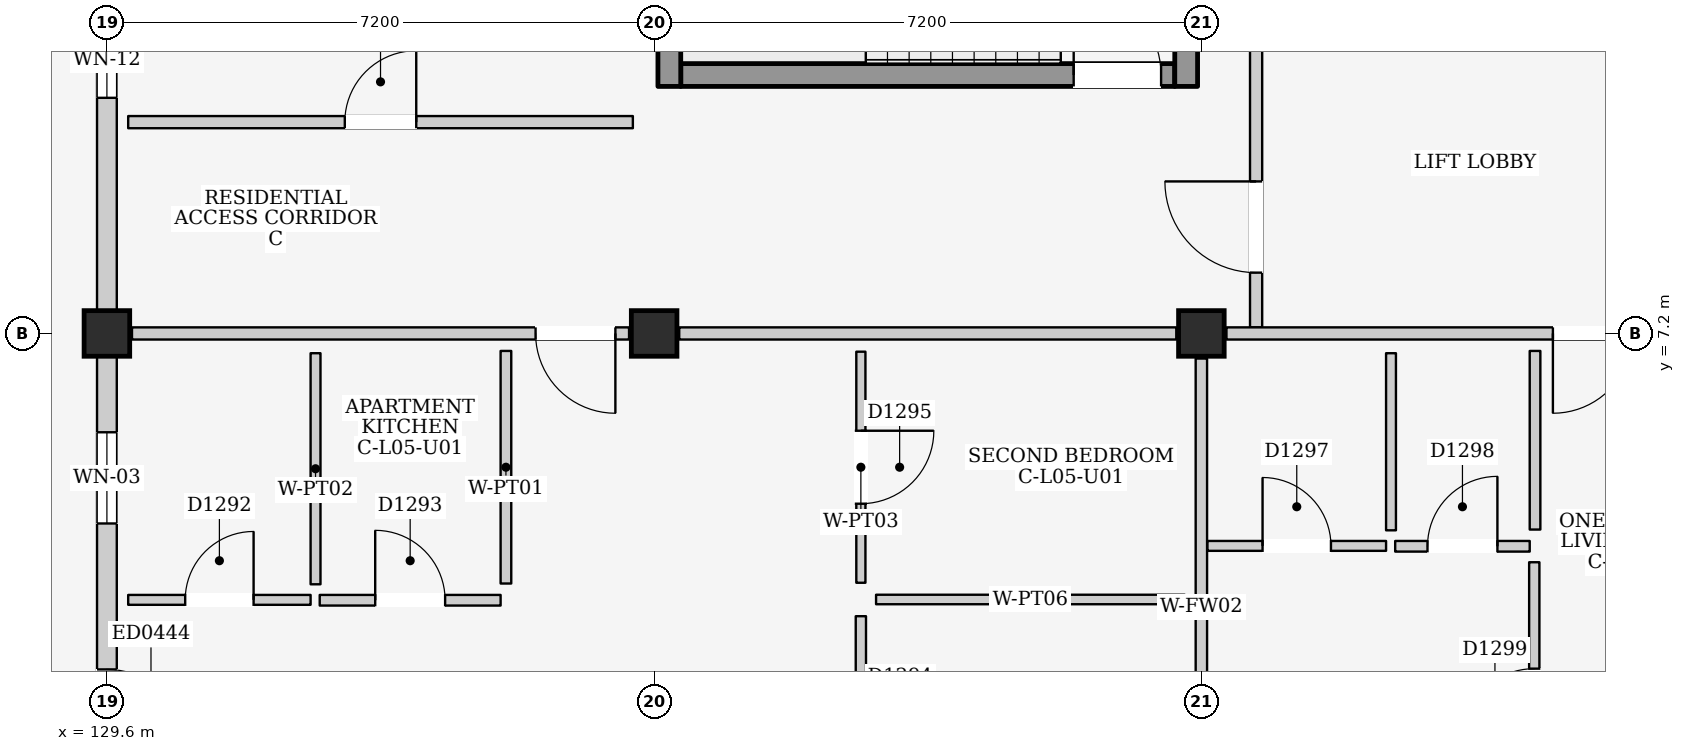
"""IFC4 building model, lengths in metres.
Left out: names, types, materials, properties, quantities, classifications, styles, units other than length and angle.
Written with IfcOpenShell. Run it as: python <this file> out.ifc"""

import sys

from ifc_helpers import new_model, si_unit, direction, frame, frame_2d, origin, origin_2d, place, context, subcontext, project, spatial, rectangle, extrude, element, fill, save


model = new_model("IFC4")
c1 = context("Model", 3, precision=1e-05, world=origin(), true_north=direction((0.0, 1.0)))
c2 = subcontext(c1, "Body", "Model", "MODEL_VIEW")
j1 = project(units=[si_unit("LENGTHUNIT", "METRE"), si_unit("PLANEANGLEUNIT", "RADIAN")], contexts=[c1])
p1 = place(None, origin())
s1 = spatial("IfcSite", under=j1, at=p1, CompositionType="ELEMENT")
p2 = place(p1, origin())
s2 = spatial("IfcBuilding", under=s1, at=p2, CompositionType="ELEMENT")
p3 = place(p2, frame((0.0, 0.0, 18.6)))
s3 = spatial("IfcBuildingStorey", under=s2, at=p3, CompositionType="ELEMENT", Elevation=18.6)
for number, where, z_axis, x_axis in (
    (1, (129.6, 7.2, 0.0), (0.0, 0.0, 1.0), (1.0, 0.0, 0.0)),
    (2, (136.8, 7.2, 0.0), (0.0, 0.0, 1.0), (1.0, 0.0, 0.0)),
    (3, (144.0, 7.2, 0.0), (0.0, 0.0, 1.0), (1.0, 0.0, 0.0)),
):
    element("IfcColumn", number, at=place(p3, frame(where, z_axis=z_axis, x_axis=x_axis)), inside=s3, PredefinedType="COLUMN", context=c2, shape_type="SweptSolid", body=[
        extrude(rectangle(XDim=0.6, YDim=0.6, at=origin_2d()), origin(), (0.0, 0.0, 1.0), 3.3),
    ])
p4 = place(p3, frame((129.6, 0.3, 0.0), z_axis=(0.0, 0.0, 1.0), x_axis=(0.0, 1.0, 0.0)))
e4 = element("IfcWall", 4, at=p4, inside=s3, PredefinedType="ELEMENTEDWALL", context=c2, shape_type="SweptSolid", body=[
    extrude(rectangle(XDim=6.6, YDim=0.26, at=frame_2d((3.3, 0.0))), origin(), (0.0, 0.0, 1.0), 2.545),
])
p5 = place(p4, frame((1.4, 0.0, 0.0)))
e5 = element("IfcOpeningElement", 5, at=p5, cuts=e4, PredefinedType="OPENING", context=c2, shape_type="SweptSolid", body=[
    extrude(rectangle(XDim=1.08, YDim=2.12, at=frame_2d((0.54, 1.06))), frame((0.0, 0.145, 0.0), z_axis=(0.0, -1.0, 0.0), x_axis=(1.0, 0.0, 0.0)), (0.0, 0.0, 1.0), 0.29),
])
p6 = place(p4, frame((4.4, 0.0, 0.95)))
e6 = element("IfcOpeningElement", 6, at=p6, cuts=e4, PredefinedType="OPENING", context=c2, shape_type="SweptSolid", body=[
    extrude(rectangle(XDim=1.2, YDim=1.35, at=frame_2d((0.6, 0.675))), frame((0.0, 0.145, 0.0), z_axis=(0.0, -1.0, 0.0), x_axis=(1.0, 0.0, 0.0)), (0.0, 0.0, 1.0), 0.29),
])
p7 = place(p3, frame((129.6, 7.5, 0.0), z_axis=(0.0, 0.0, 1.0), x_axis=(0.0, 1.0, 0.0)))
e7 = element("IfcWall", 7, at=p7, inside=s3, PredefinedType="ELEMENTEDWALL", context=c2, shape_type="SweptSolid", body=[
    extrude(rectangle(XDim=6.6, YDim=0.26, at=frame_2d((3.3, 0.0))), origin(), (0.0, 0.0, 1.0), 2.545),
])
p8 = place(p7, frame((2.8, 0.0, 1.1)))
e8 = element("IfcOpeningElement", 8, at=p8, cuts=e7, PredefinedType="OPENING", context=c2, shape_type="SweptSolid", body=[
    extrude(rectangle(XDim=1.0, YDim=0.9, at=frame_2d((0.5, 0.45))), frame((0.0, 0.145, 0.0), z_axis=(0.0, -1.0, 0.0), x_axis=(1.0, 0.0, 0.0)), (0.0, 0.0, 1.0), 0.29),
])
p9 = place(p3, frame((137.15, 10.6, 0.0), z_axis=(0.0, 0.0, 1.0), x_axis=(1.0, 0.0, 0.0)))
e9 = element("IfcWall", 9, at=p9, inside=s3, PredefinedType="SHEAR", context=c2, shape_type="SweptSolid", body=[
    extrude(rectangle(XDim=6.5, YDim=0.3, at=frame_2d((3.25, 0.0))), origin(), (0.0, 0.0, 1.0), 3.06),
])
p10 = place(p9, frame((5.17, 0.0, 0.0)))
e10 = element("IfcOpeningElement", 10, at=p10, cuts=e9, PredefinedType="OPENING", context=c2, shape_type="SweptSolid", body=[
    extrude(rectangle(XDim=1.15, YDim=2.2, at=frame_2d((0.575, 1.1))), frame((0.0, 0.165, 0.0), z_axis=(0.0, -1.0, 0.0), x_axis=(1.0, 0.0, 0.0)), (0.0, 0.0, 1.0), 0.33),
])
p11 = place(p3, frame((137.0, 10.45, 0.0), z_axis=(0.0, 0.0, 1.0), x_axis=(0.0, 1.0, 0.0)))
e11 = element("IfcWall", 11, at=p11, inside=s3, PredefinedType="SHEAR", context=c2, shape_type="SweptSolid", body=[
    extrude(rectangle(XDim=3.6, YDim=0.3, at=frame_2d((1.8, 0.0))), origin(), (0.0, 0.0, 1.0), 3.06),
])
p12 = place(p3, frame((143.8, 10.45, 0.0), z_axis=(0.0, 0.0, 1.0), x_axis=(0.0, 1.0, 0.0)))
e12 = element("IfcWall", 12, at=p12, inside=s3, PredefinedType="SHEAR", context=c2, shape_type="SweptSolid", body=[
    extrude(rectangle(XDim=3.75, YDim=0.3, at=frame_2d((1.875, 0.0))), origin(), (0.0, 0.0, 1.0), 3.06),
])
p13 = place(p3, frame((144.72, 7.28, 0.0), z_axis=(0.0, 0.0, 1.0), x_axis=(0.0, 1.0, 0.0)))
e13 = element("IfcWall", 13, at=p13, inside=s3, PredefinedType="PARTITIONING", context=c2, shape_type="SweptSolid", body=[
    extrude(rectangle(XDim=4.32, YDim=0.16, at=frame_2d((2.16, 0.0))), origin(), (0.0, 0.0, 1.0), 3.06),
])
p14 = place(p13, frame((0.72, 0.0, 0.0)))
e14 = element("IfcOpeningElement", 14, at=p14, cuts=e13, PredefinedType="OPENING", context=c2, shape_type="SweptSolid", body=[
    extrude(rectangle(XDim=1.2, YDim=2.2, at=frame_2d((0.6, 1.1))), frame((0.0, 0.095, 0.0), z_axis=(0.0, -1.0, 0.0), x_axis=(1.0, 0.0, 0.0)), (0.0, 0.0, 1.0), 0.19),
])
p15 = place(p3, frame((129.93, 7.2, 0.0), z_axis=(0.0, 0.0, 1.0), x_axis=(1.0, 0.0, 0.0)))
e15 = element("IfcWall", 15, at=p15, inside=s3, PredefinedType="PARTITIONING", context=c2, shape_type="SweptSolid", body=[
    extrude(rectangle(XDim=6.54, YDim=0.16, at=frame_2d((3.27, 0.0))), origin(), (0.0, 0.0, 1.0), 2.445),
])
p16 = place(p15, frame((5.31, 0.0, 0.0)))
e16 = element("IfcOpeningElement", 16, at=p16, cuts=e15, PredefinedType="OPENING", context=c2, shape_type="SweptSolid", body=[
    extrude(rectangle(XDim=1.05, YDim=2.15, at=frame_2d((0.525, 1.075))), frame((0.0, 0.095, 0.0), z_axis=(0.0, -1.0, 0.0), x_axis=(1.0, 0.0, 0.0)), (0.0, 0.0, 1.0), 0.19),
])
p17 = place(p3, frame((137.13, 7.2, 0.0), z_axis=(0.0, 0.0, 1.0), x_axis=(1.0, 0.0, 0.0)))
e17 = element("IfcWall", 17, at=p17, inside=s3, PredefinedType="PARTITIONING", context=c2, shape_type="SweptSolid", body=[
    extrude(rectangle(XDim=6.54, YDim=0.16, at=frame_2d((3.27, 0.0))), origin(), (0.0, 0.0, 1.0), 2.445),
])
p18 = place(p3, frame((144.0, 0.33, 0.0), z_axis=(0.0, 0.0, 1.0), x_axis=(0.0, 1.0, 0.0)))
e18 = element("IfcWall", 18, at=p18, inside=s3, PredefinedType="PARTITIONING", context=c2, shape_type="SweptSolid", body=[
    extrude(rectangle(XDim=6.54, YDim=0.15, at=frame_2d((3.27, 0.0))), origin(), (0.0, 0.0, 1.0), 2.545),
])
p19 = place(p3, frame((129.88, 3.695, 0.0), z_axis=(0.0, 0.0, 1.0), x_axis=(1.0, 0.0, 0.0)))
e19 = element("IfcWall", 19, at=p19, inside=s3, PredefinedType="PARTITIONING", context=c2, shape_type="SweptSolid", body=[
    extrude(rectangle(XDim=2.4, YDim=0.13, at=frame_2d((1.2, 0.0))), origin(), (0.0, 0.0, 1.0), 3.06),
])
p20 = place(p19, frame((0.75, 0.0, 0.0)))
e20 = element("IfcOpeningElement", 20, at=p20, cuts=e19, PredefinedType="OPENING", context=c2, shape_type="SweptSolid", body=[
    extrude(rectangle(XDim=0.9, YDim=2.1, at=frame_2d((0.45, 1.05))), frame((0.0, 0.08, 0.0), z_axis=(0.0, -1.0, 0.0), x_axis=(1.0, 0.0, 0.0)), (0.0, 0.0, 1.0), 0.16),
])
p21 = place(p3, frame((132.345, 3.9, 0.0), z_axis=(0.0, 0.0, 1.0), x_axis=(0.0, 1.0, 0.0)))
e21 = element("IfcWall", 21, at=p21, inside=s3, PredefinedType="PARTITIONING", context=c2, shape_type="SweptSolid", body=[
    extrude(rectangle(XDim=3.04, YDim=0.13, at=frame_2d((1.52, 0.0))), origin(), (0.0, 0.0, 1.0), 3.06),
])
p22 = place(p3, frame((132.4, 3.69, 0.0), z_axis=(0.0, 0.0, 1.0), x_axis=(1.0, 0.0, 0.0)))
e22 = element("IfcWall", 22, at=p22, inside=s3, PredefinedType="PARTITIONING", context=c2, shape_type="SweptSolid", body=[
    extrude(rectangle(XDim=2.38, YDim=0.14, at=frame_2d((1.19, 0.0))), origin(), (0.0, 0.0, 1.0), 3.06),
])
p23 = place(p22, frame((0.73, 0.0, 0.0)))
e23 = element("IfcOpeningElement", 23, at=p23, cuts=e22, PredefinedType="OPENING", context=c2, shape_type="SweptSolid", body=[
    extrude(rectangle(XDim=0.92, YDim=2.1, at=frame_2d((0.46, 1.05))), frame((0.0, 0.085, 0.0), z_axis=(0.0, -1.0, 0.0), x_axis=(1.0, 0.0, 0.0)), (0.0, 0.0, 1.0), 0.17),
])
p24 = place(p3, frame((134.85, 3.91, 0.0), z_axis=(0.0, 0.0, 1.0), x_axis=(0.0, 1.0, 0.0)))
e24 = element("IfcWall", 24, at=p24, inside=s3, PredefinedType="PARTITIONING", context=c2, shape_type="SweptSolid", body=[
    extrude(rectangle(XDim=3.06, YDim=0.14, at=frame_2d((1.53, 0.0))), origin(), (0.0, 0.0, 1.0), 3.06),
])
p25 = place(p3, frame((139.52, 0.44, 0.0), z_axis=(0.0, 0.0, 1.0), x_axis=(0.0, 1.0, 0.0)))
e25 = element("IfcWall", 25, at=p25, inside=s3, PredefinedType="PARTITIONING", context=c2, shape_type="SweptSolid", body=[
    extrude(rectangle(XDim=3.04, YDim=0.135, at=frame_2d((1.52, 0.0))), origin(), (0.0, 0.0, 1.0), 3.06),
])
p26 = place(p25, frame((1.045, 0.0, 0.0)))
e26 = element("IfcOpeningElement", 26, at=p26, cuts=e25, PredefinedType="OPENING", context=c2, shape_type="SweptSolid", body=[
    extrude(rectangle(XDim=0.95, YDim=2.15, at=frame_2d((0.475, 1.075))), frame((0.0, 0.083, 0.0), z_axis=(0.0, -1.0, 0.0), x_axis=(1.0, 0.0, 0.0)), (0.0, 0.0, 1.0), 0.165),
])
p27 = place(p3, frame((139.72, 3.7, 0.0), z_axis=(0.0, 0.0, 1.0), x_axis=(1.0, 0.0, 0.0)))
e27 = element("IfcWall", 27, at=p27, inside=s3, PredefinedType="PARTITIONING", context=c2, shape_type="SweptSolid", body=[
    extrude(rectangle(XDim=4.06, YDim=0.125, at=frame_2d((2.03, 0.0))), origin(), (0.0, 0.0, 1.0), 3.06),
])
p28 = place(p3, frame((139.52, 3.92, 0.0), z_axis=(0.0, 0.0, 1.0), x_axis=(0.0, 1.0, 0.0)))
e28 = element("IfcWall", 28, at=p28, inside=s3, PredefinedType="PARTITIONING", context=c2, shape_type="SweptSolid", body=[
    extrude(rectangle(XDim=3.04, YDim=0.12, at=frame_2d((1.52, 0.0))), origin(), (0.0, 0.0, 1.0), 3.06),
])
p29 = place(p28, frame((1.04, 0.0, 0.0)))
e29 = element("IfcOpeningElement", 29, at=p29, cuts=e28, PredefinedType="OPENING", context=c2, shape_type="SweptSolid", body=[
    extrude(rectangle(XDim=0.96, YDim=2.15, at=frame_2d((0.48, 1.075))), frame((0.0, 0.075, 0.0), z_axis=(0.0, -1.0, 0.0), x_axis=(1.0, 0.0, 0.0)), (0.0, 0.0, 1.0), 0.15),
])
p30 = place(p3, frame((144.33, 7.2, 0.0), z_axis=(0.0, 0.0, 1.0), x_axis=(1.0, 0.0, 0.0)))
e30 = element("IfcWall", 30, at=p30, inside=s3, PredefinedType="PARTITIONING", context=c2, shape_type="SweptSolid", body=[
    extrude(rectangle(XDim=6.54, YDim=0.16, at=frame_2d((3.27, 0.0))), origin(), (0.0, 0.0, 1.0), 2.445),
])
p31 = place(p30, frame((4.295, 0.0, 0.0)))
e31 = element("IfcOpeningElement", 31, at=p31, cuts=e30, PredefinedType="OPENING", context=c2, shape_type="SweptSolid", body=[
    extrude(rectangle(XDim=1.05, YDim=2.15, at=frame_2d((0.525, 1.075))), frame((0.0, 0.095, 0.0), z_axis=(0.0, -1.0, 0.0), x_axis=(1.0, 0.0, 0.0)), (0.0, 0.0, 1.0), 0.19),
])
p32 = place(p3, frame((144.08, 4.405, 0.0), z_axis=(0.0, 0.0, 1.0), x_axis=(1.0, 0.0, 0.0)))
e32 = element("IfcWall", 32, at=p32, inside=s3, PredefinedType="PARTITIONING", context=c2, shape_type="SweptSolid", body=[
    extrude(rectangle(XDim=2.35, YDim=0.13, at=frame_2d((1.175, 0.0))), origin(), (0.0, 0.0, 1.0), 3.06),
])
p33 = place(p32, frame((0.725, 0.0, 0.0)))
e33 = element("IfcOpeningElement", 33, at=p33, cuts=e32, PredefinedType="OPENING", context=c2, shape_type="SweptSolid", body=[
    extrude(rectangle(XDim=0.9, YDim=2.1, at=frame_2d((0.45, 1.05))), frame((0.0, 0.08, 0.0), z_axis=(0.0, -1.0, 0.0), x_axis=(1.0, 0.0, 0.0)), (0.0, 0.0, 1.0), 0.16),
])
p34 = place(p3, frame((146.495, 4.61, 0.0), z_axis=(0.0, 0.0, 1.0), x_axis=(0.0, 1.0, 0.0)))
e34 = element("IfcWall", 34, at=p34, inside=s3, PredefinedType="PARTITIONING", context=c2, shape_type="SweptSolid", body=[
    extrude(rectangle(XDim=2.33, YDim=0.13, at=frame_2d((1.165, 0.0))), origin(), (0.0, 0.0, 1.0), 3.06),
])
p35 = place(p3, frame((146.55, 4.4, 0.0), z_axis=(0.0, 0.0, 1.0), x_axis=(1.0, 0.0, 0.0)))
e35 = element("IfcWall", 35, at=p35, inside=s3, PredefinedType="PARTITIONING", context=c2, shape_type="SweptSolid", body=[
    extrude(rectangle(XDim=1.77, YDim=0.14, at=frame_2d((0.885, 0.0))), origin(), (0.0, 0.0, 1.0), 3.06),
])
p36 = place(p35, frame((0.425, 0.0, 0.0)))
e36 = element("IfcOpeningElement", 36, at=p36, cuts=e35, PredefinedType="OPENING", context=c2, shape_type="SweptSolid", body=[
    extrude(rectangle(XDim=0.92, YDim=2.1, at=frame_2d((0.46, 1.05))), frame((0.0, 0.085, 0.0), z_axis=(0.0, -1.0, 0.0), x_axis=(1.0, 0.0, 0.0)), (0.0, 0.0, 1.0), 0.17),
])
p37 = place(p3, frame((148.39, 4.62, 0.0), z_axis=(0.0, 0.0, 1.0), x_axis=(0.0, 1.0, 0.0)))
e37 = element("IfcWall", 37, at=p37, inside=s3, PredefinedType="PARTITIONING", context=c2, shape_type="SweptSolid", body=[
    extrude(rectangle(XDim=2.35, YDim=0.14, at=frame_2d((1.175, 0.0))), origin(), (0.0, 0.0, 1.0), 3.06),
])
p38 = place(p3, frame((148.38, 0.44, 0.0), z_axis=(0.0, 0.0, 1.0), x_axis=(0.0, 1.0, 0.0)))
e38 = element("IfcWall", 38, at=p38, inside=s3, PredefinedType="PARTITIONING", context=c2, shape_type="SweptSolid", body=[
    extrude(rectangle(XDim=3.75, YDim=0.135, at=frame_2d((1.875, 0.0))), origin(), (0.0, 0.0, 1.0), 3.06),
])
p39 = place(p38, frame((1.4, 0.0, 0.0)))
e39 = element("IfcOpeningElement", 39, at=p39, cuts=e38, PredefinedType="OPENING", context=c2, shape_type="SweptSolid", body=[
    extrude(rectangle(XDim=0.95, YDim=2.15, at=frame_2d((0.475, 1.075))), frame((0.0, 0.083, 0.0), z_axis=(0.0, -1.0, 0.0), x_axis=(1.0, 0.0, 0.0)), (0.0, 0.0, 1.0), 0.165),
])
p40 = place(p3, frame((129.88, 9.98, 0.0), z_axis=(0.0, 0.0, 1.0), x_axis=(1.0, 0.0, 0.0)))
e40 = element("IfcWall", 40, at=p40, inside=s3, PredefinedType="PARTITIONING", context=c2, shape_type="SweptSolid", body=[
    extrude(rectangle(XDim=6.64, YDim=0.16, at=frame_2d((3.32, 0.0))), origin(), (0.0, 0.0, 1.0), 3.06),
])
p41 = place(p40, frame((2.85, 0.0, 0.0)))
e41 = element("IfcOpeningElement", 41, at=p41, cuts=e40, PredefinedType="OPENING", context=c2, shape_type="SweptSolid", body=[
    extrude(rectangle(XDim=0.94, YDim=2.12, at=frame_2d((0.47, 1.06))), frame((0.0, 0.095, 0.0), z_axis=(0.0, -1.0, 0.0), x_axis=(1.0, 0.0, 0.0)), (0.0, 0.0, 1.0), 0.19),
])
p42 = place(p5, frame((1.08, 0.0, 0.0), z_axis=(0.0, 0.0, 1.0), x_axis=(-1.0, 0.0, 0.0)))
e42 = element("IfcDoor", 42, at=p42, inside=s3, OperationType="SINGLE_SWING_RIGHT", PredefinedType="DOOR", context=c2, shape_type="SweptSolid", body=[
    extrude(rectangle(XDim=1.08, YDim=2.12, at=frame_2d((0.54, 1.06))), frame((0.0, 0.025, 0.0), z_axis=(0.0, -1.0, 0.0), x_axis=(1.0, 0.0, 0.0)), (0.0, 0.0, 1.0), 0.05),
])
fill(e5, e42)
p43 = place(p6, origin())
e43 = element("IfcWindow", 43, at=p43, inside=s3, PartitioningType="SINGLE_PANEL", PredefinedType="WINDOW", context=c2, shape_type="SweptSolid", body=[
    extrude(rectangle(XDim=1.2, YDim=1.35, at=frame_2d((0.6, 0.675))), frame((0.0, 0.03, 0.0), z_axis=(0.0, -1.0, 0.0), x_axis=(1.0, 0.0, 0.0)), (0.0, 0.0, 1.0), 0.06),
])
fill(e6, e43)
p44 = place(p8, origin())
e44 = element("IfcWindow", 44, at=p44, inside=s3, PartitioningType="SINGLE_PANEL", PredefinedType="WINDOW", context=c2, shape_type="SweptSolid", body=[
    extrude(rectangle(XDim=1.0, YDim=0.9, at=frame_2d((0.5, 0.45))), frame((0.0, 0.03, 0.0), z_axis=(0.0, -1.0, 0.0), x_axis=(1.0, 0.0, 0.0)), (0.0, 0.0, 1.0), 0.06),
])
fill(e8, e44)
p45 = place(p10, origin())
e45 = element("IfcDoor", 45, at=p45, inside=s3, OperationType="SINGLE_SWING_LEFT", PredefinedType="DOOR", context=c2, shape_type="SweptSolid", body=[
    extrude(rectangle(XDim=1.15, YDim=2.2, at=frame_2d((0.575, 1.1))), frame((0.0, 0.025, 0.0), z_axis=(0.0, -1.0, 0.0), x_axis=(1.0, 0.0, 0.0)), (0.0, 0.0, 1.0), 0.05),
])
fill(e10, e45)
p46 = place(p14, origin())
e46 = element("IfcDoor", 46, at=p46, inside=s3, OperationType="SINGLE_SWING_RIGHT", PredefinedType="DOOR", context=c2, shape_type="SweptSolid", body=[
    extrude(rectangle(XDim=1.2, YDim=2.2, at=frame_2d((0.6, 1.1))), frame((0.0, 0.025, 0.0), z_axis=(0.0, -1.0, 0.0), x_axis=(1.0, 0.0, 0.0)), (0.0, 0.0, 1.0), 0.05),
])
fill(e14, e46)
p47 = place(p16, frame((1.05, 0.0, 0.0), z_axis=(0.0, 0.0, 1.0), x_axis=(-1.0, 0.0, 0.0)))
e47 = element("IfcDoor", 47, at=p47, inside=s3, OperationType="SINGLE_SWING_LEFT", PredefinedType="DOOR", context=c2, shape_type="SweptSolid", body=[
    extrude(rectangle(XDim=1.05, YDim=2.15, at=frame_2d((0.525, 1.075))), frame((0.0, 0.025, 0.0), z_axis=(0.0, -1.0, 0.0), x_axis=(1.0, 0.0, 0.0)), (0.0, 0.0, 1.0), 0.05),
])
fill(e16, e47)
p48 = place(p20, origin())
e48 = element("IfcDoor", 48, at=p48, inside=s3, OperationType="SINGLE_SWING_RIGHT", PredefinedType="DOOR", context=c2, shape_type="SweptSolid", body=[
    extrude(rectangle(XDim=0.9, YDim=2.1, at=frame_2d((0.45, 1.05))), frame((0.0, 0.025, 0.0), z_axis=(0.0, -1.0, 0.0), x_axis=(1.0, 0.0, 0.0)), (0.0, 0.0, 1.0), 0.05),
])
fill(e20, e48)
p49 = place(p23, origin())
e49 = element("IfcDoor", 49, at=p49, inside=s3, OperationType="SINGLE_SWING_LEFT", PredefinedType="DOOR", context=c2, shape_type="SweptSolid", body=[
    extrude(rectangle(XDim=0.92, YDim=2.1, at=frame_2d((0.46, 1.05))), frame((0.0, 0.025, 0.0), z_axis=(0.0, -1.0, 0.0), x_axis=(1.0, 0.0, 0.0)), (0.0, 0.0, 1.0), 0.05),
])
fill(e23, e49)
p50 = place(p29, frame((0.96, 0.0, 0.0), z_axis=(0.0, 0.0, 1.0), x_axis=(-1.0, 0.0, 0.0)))
e50 = element("IfcDoor", 50, at=p50, inside=s3, OperationType="SINGLE_SWING_LEFT", PredefinedType="DOOR", context=c2, shape_type="SweptSolid", body=[
    extrude(rectangle(XDim=0.96, YDim=2.15, at=frame_2d((0.48, 1.075))), frame((0.0, 0.025, 0.0), z_axis=(0.0, -1.0, 0.0), x_axis=(1.0, 0.0, 0.0)), (0.0, 0.0, 1.0), 0.05),
])
fill(e29, e50)
p51 = place(p31, frame((1.05, 0.0, 0.0), z_axis=(0.0, 0.0, 1.0), x_axis=(-1.0, 0.0, 0.0)))
e51 = element("IfcDoor", 51, at=p51, inside=s3, OperationType="SINGLE_SWING_RIGHT", PredefinedType="DOOR", context=c2, shape_type="SweptSolid", body=[
    extrude(rectangle(XDim=1.05, YDim=2.15, at=frame_2d((0.525, 1.075))), frame((0.0, 0.025, 0.0), z_axis=(0.0, -1.0, 0.0), x_axis=(1.0, 0.0, 0.0)), (0.0, 0.0, 1.0), 0.05),
])
fill(e31, e51)
p52 = place(p33, origin())
e52 = element("IfcDoor", 52, at=p52, inside=s3, OperationType="SINGLE_SWING_LEFT", PredefinedType="DOOR", context=c2, shape_type="SweptSolid", body=[
    extrude(rectangle(XDim=0.9, YDim=2.1, at=frame_2d((0.45, 1.05))), frame((0.0, 0.025, 0.0), z_axis=(0.0, -1.0, 0.0), x_axis=(1.0, 0.0, 0.0)), (0.0, 0.0, 1.0), 0.05),
])
fill(e33, e52)
p53 = place(p36, origin())
e53 = element("IfcDoor", 53, at=p53, inside=s3, OperationType="SINGLE_SWING_RIGHT", PredefinedType="DOOR", context=c2, shape_type="SweptSolid", body=[
    extrude(rectangle(XDim=0.92, YDim=2.1, at=frame_2d((0.46, 1.05))), frame((0.0, 0.025, 0.0), z_axis=(0.0, -1.0, 0.0), x_axis=(1.0, 0.0, 0.0)), (0.0, 0.0, 1.0), 0.05),
])
fill(e36, e53)
p54 = place(p39, origin())
e54 = element("IfcDoor", 54, at=p54, inside=s3, OperationType="SINGLE_SWING_LEFT", PredefinedType="DOOR", context=c2, shape_type="SweptSolid", body=[
    extrude(rectangle(XDim=0.95, YDim=2.15, at=frame_2d((0.475, 1.075))), frame((0.0, 0.025, 0.0), z_axis=(0.0, -1.0, 0.0), x_axis=(1.0, 0.0, 0.0)), (0.0, 0.0, 1.0), 0.05),
])
fill(e39, e54)
p55 = place(p41, origin())
e55 = element("IfcDoor", 55, at=p55, inside=s3, OperationType="SINGLE_SWING_RIGHT", PredefinedType="DOOR", context=c2, shape_type="SweptSolid", body=[
    extrude(rectangle(XDim=0.94, YDim=2.12, at=frame_2d((0.47, 1.06))), frame((0.0, 0.025, 0.0), z_axis=(0.0, -1.0, 0.0), x_axis=(1.0, 0.0, 0.0)), (0.0, 0.0, 1.0), 0.05),
])
fill(e41, e55)
save(model, sys.argv[1])
